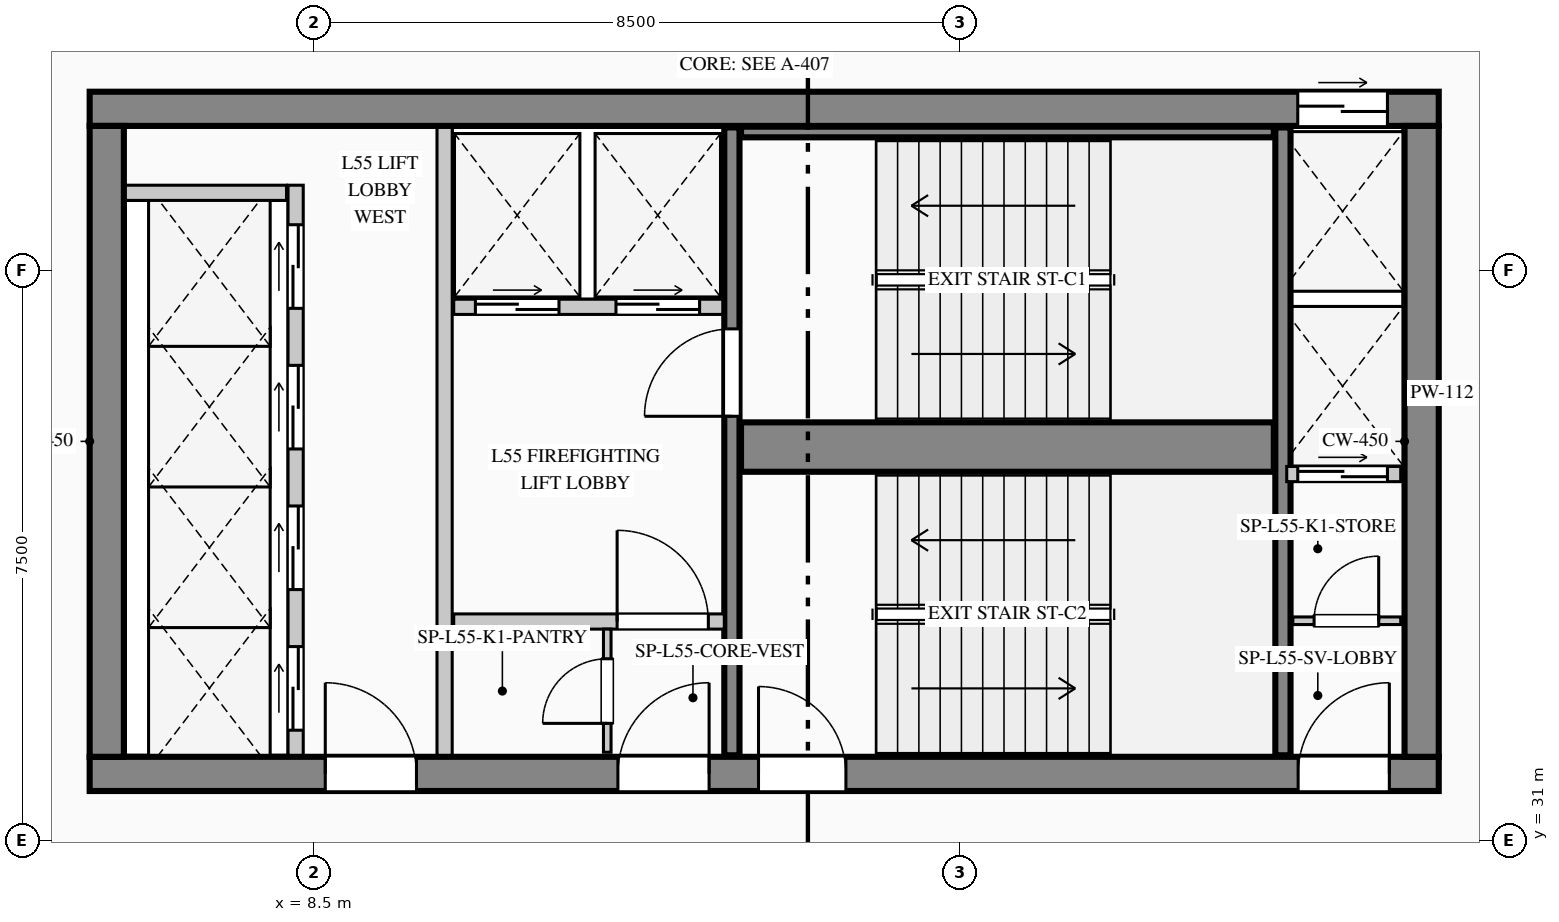
"""IFC4 building model, lengths in metres.
Left out: names, types, materials, properties, quantities, classifications, styles, units other than length and angle.
Written with IfcOpenShell. Run it as: python <this file> out.ifc"""

import sys

from ifc_helpers import new_model, si_unit, direction, frame, frame_2d, origin, place, context, subcontext, project, spatial, rectangle, extrude, element, fill, save


model = new_model("IFC4")
c1 = context("Model", 3, precision=1e-05, world=origin(), true_north=direction((0.0, 1.0)))
c2 = subcontext(c1, "Body", "Model", "MODEL_VIEW")
j1 = project(units=[si_unit("LENGTHUNIT", "METRE"), si_unit("PLANEANGLEUNIT", "RADIAN")], contexts=[c1])
p1 = place(None, origin())
s1 = spatial("IfcSite", under=j1, at=p1, CompositionType="ELEMENT")
p2 = place(p1, origin())
s2 = spatial("IfcBuilding", under=s1, at=p2, CompositionType="ELEMENT")
p3 = place(p2, frame((0.0, 0.0, 231.15)))
s3 = spatial("IfcBuildingStorey", under=s2, at=p3, CompositionType="ELEMENT", Elevation=231.15)
p4 = place(p3, frame((5.55, 40.625, 0.0), z_axis=(0.0, 0.0, 1.0), x_axis=(1.0, 0.0, 0.0)))
e1 = element("IfcWall", 1, at=p4, inside=s3, PredefinedType="SHEAR", context=c2, shape_type="SweptSolid", body=[
    extrude(rectangle(XDim=17.75, YDim=0.45, at=frame_2d((8.875, 0.0))), origin(), (0.0, 0.0, 1.0), 3.95),
])
p5 = place(p4, frame((15.895, 0.0, 0.0)))
e2 = element("IfcOpeningElement", 2, at=p5, cuts=e1, PredefinedType="OPENING", context=c2, shape_type="SweptSolid", body=[
    extrude(rectangle(XDim=1.18, YDim=2.25, at=frame_2d((0.59, 1.125))), frame((0.0, 0.235, 0.0), z_axis=(0.0, -1.0, 0.0), x_axis=(1.0, 0.0, 0.0)), (0.0, 0.0, 1.0), 0.47),
])
p6 = place(p3, frame((5.55, 31.875, 0.0), z_axis=(0.0, 0.0, 1.0), x_axis=(1.0, 0.0, 0.0)))
e3 = element("IfcWall", 3, at=p6, inside=s3, PredefinedType="SHEAR", context=c2, shape_type="SweptSolid", body=[
    extrude(rectangle(XDim=17.75, YDim=0.45, at=frame_2d((8.875, 0.0))), origin(), (0.0, 0.0, 1.0), 3.95),
])
p7 = place(p6, frame((3.1, 0.0, 0.0)))
e4 = element("IfcOpeningElement", 4, at=p7, cuts=e3, PredefinedType="OPENING", context=c2, shape_type="SweptSolid", body=[
    extrude(rectangle(XDim=1.2, YDim=2.2, at=frame_2d((0.6, 1.1))), frame((0.0, 0.235, 0.0), z_axis=(0.0, -1.0, 0.0), x_axis=(1.0, 0.0, 0.0)), (0.0, 0.0, 1.0), 0.47),
])
p8 = place(p6, frame((6.95, 0.0, 0.0)))
e5 = element("IfcOpeningElement", 5, at=p8, cuts=e3, PredefinedType="OPENING", context=c2, shape_type="SweptSolid", body=[
    extrude(rectangle(XDim=1.2, YDim=2.2, at=frame_2d((0.6, 1.1))), frame((0.0, 0.235, 0.0), z_axis=(0.0, -1.0, 0.0), x_axis=(1.0, 0.0, 0.0)), (0.0, 0.0, 1.0), 0.47),
])
p9 = place(p6, frame((8.8, 0.0, 0.0)))
e6 = element("IfcOpeningElement", 6, at=p9, cuts=e3, PredefinedType="OPENING", context=c2, shape_type="SweptSolid", body=[
    extrude(rectangle(XDim=1.15, YDim=2.2, at=frame_2d((0.575, 1.1))), frame((0.0, 0.235, 0.0), z_axis=(0.0, -1.0, 0.0), x_axis=(1.0, 0.0, 0.0)), (0.0, 0.0, 1.0), 0.47),
])
p10 = place(p6, frame((15.9, 0.0, 0.0)))
e7 = element("IfcOpeningElement", 7, at=p10, cuts=e3, PredefinedType="OPENING", context=c2, shape_type="SweptSolid", body=[
    extrude(rectangle(XDim=1.2, YDim=2.2, at=frame_2d((0.6, 1.1))), frame((0.0, 0.235, 0.0), z_axis=(0.0, -1.0, 0.0), x_axis=(1.0, 0.0, 0.0)), (0.0, 0.0, 1.0), 0.47),
])
for number, where, z_axis, x_axis in (
    (8, (5.775, 32.1, 0.0), (0.0, 0.0, 1.0), (0.0, 1.0, 0.0)),
    (9, (23.075, 32.1, 0.0), (0.0, 0.0, 1.0), (0.0, 1.0, 0.0)),
):
    element("IfcWall", number, at=place(p3, frame(where, z_axis=z_axis, x_axis=x_axis)), inside=s3, PredefinedType="SHEAR", context=c2, shape_type="SweptSolid", body=[
        extrude(rectangle(XDim=8.3, YDim=0.45, at=frame_2d((4.15, 0.0))), origin(), (0.0, 0.0, 1.0), 3.95),
    ])
p11 = place(p3, frame((14.0, 32.12, 0.0), z_axis=(0.0, 0.0, 1.0), x_axis=(0.0, 1.0, 0.0)))
e10 = element("IfcWall", 10, at=p11, inside=s3, PredefinedType="SHEAR", context=c2, shape_type="SweptSolid", body=[
    extrude(rectangle(XDim=8.26, YDim=0.2, at=frame_2d((4.13, 0.0))), origin(), (0.0, 0.0, 1.0), 3.95),
])
p12 = place(p11, frame((4.46, 0.0, 0.0)))
e11 = element("IfcOpeningElement", 11, at=p12, cuts=e10, PredefinedType="OPENING", context=c2, shape_type="SweptSolid", body=[
    extrude(rectangle(XDim=1.15, YDim=2.2, at=frame_2d((0.575, 1.1))), frame((0.0, 0.11, 0.0), z_axis=(0.0, -1.0, 0.0), x_axis=(1.0, 0.0, 0.0)), (0.0, 0.0, 1.0), 0.22),
])
p13 = place(p3, frame((14.12, 36.175, 0.0), z_axis=(0.0, 0.0, 1.0), x_axis=(1.0, 0.0, 0.0)))
e12 = element("IfcWall", 12, at=p13, inside=s3, PredefinedType="SHEAR", context=c2, shape_type="SweptSolid", body=[
    extrude(rectangle(XDim=7.01, YDim=0.65, at=frame_2d((3.505, 0.0))), origin(), (0.0, 0.0, 1.0), 3.95),
])
p14 = place(p3, frame((21.25, 32.12, 0.0), z_axis=(0.0, 0.0, 1.0), x_axis=(0.0, 1.0, 0.0)))
e13 = element("IfcWall", 13, at=p14, inside=s3, PredefinedType="SHEAR", context=c2, shape_type="SweptSolid", body=[
    extrude(rectangle(XDim=8.26, YDim=0.2, at=frame_2d((4.13, 0.0))), origin(), (0.0, 0.0, 1.0), 3.95),
])
p15 = place(p3, frame((14.12, 40.32, 0.0), z_axis=(0.0, 0.0, 1.0), x_axis=(1.0, 0.0, 0.0)))
e14 = element("IfcWall", 14, at=p15, inside=s3, PredefinedType="SHEAR", context=c2, shape_type="SweptSolid", body=[
    extrude(rectangle(XDim=7.01, YDim=0.14, at=frame_2d((3.505, 0.0))), origin(), (0.0, 0.0, 1.0), 3.95),
])
p16 = place(p3, frame((7.46, 4.62, 0.0), z_axis=(0.0, 0.0, 1.0), x_axis=(-0.123515576323, 0.992342633573, 0.0)))
e15 = element("IfcWall", 15, at=p16, inside=s3, PredefinedType="STANDARD", context=c2, shape_type="SweptSolid", body=[
    extrude(rectangle(XDim=37.043, YDim=0.24, at=frame_2d((18.522, 0.0))), origin(), (0.0, 0.0, 1.0), 3.7),
])
p17 = place(p16, frame((10.379, 0.0, 0.9)))
e16 = element("IfcOpeningElement", 16, at=p17, cuts=e15, PredefinedType="OPENING", context=c2, shape_type="SweptSolid", body=[
    extrude(rectangle(XDim=2.7, YDim=2.1, at=frame_2d((1.35, 1.05))), frame((0.0, 0.13, 0.0), z_axis=(0.0, -1.0, 0.0), x_axis=(1.0, 0.0, 0.0)), (0.0, 0.0, 1.0), 0.26),
])
p18 = place(p3, frame((8.26, 32.12, 0.0), z_axis=(0.0, 0.0, 1.0), x_axis=(0.0, 1.0, 0.0)))
e17 = element("IfcWall", 17, at=p18, inside=s3, PredefinedType="PARTITIONING", context=c2, shape_type="SweptSolid", body=[
    extrude(rectangle(XDim=7.5, YDim=0.2, at=frame_2d((3.75, 0.0))), origin(), (0.0, 0.0, 1.0), 3.7),
])
p19 = place(p18, frame((0.33, 0.0, 0.0)))
e18 = element("IfcOpeningElement", 18, at=p19, cuts=e17, PredefinedType="OPENING", context=c2, shape_type="SweptSolid", body=[
    extrude(rectangle(XDim=1.1, YDim=2.2, at=frame_2d((0.55, 1.1))), frame((0.0, 0.11, 0.0), z_axis=(0.0, -1.0, 0.0), x_axis=(1.0, 0.0, 0.0)), (0.0, 0.0, 1.0), 0.22),
])
p20 = place(p18, frame((2.18, 0.0, 0.0)))
e19 = element("IfcOpeningElement", 19, at=p20, cuts=e17, PredefinedType="OPENING", context=c2, shape_type="SweptSolid", body=[
    extrude(rectangle(XDim=1.1, YDim=2.2, at=frame_2d((0.55, 1.1))), frame((0.0, 0.11, 0.0), z_axis=(0.0, -1.0, 0.0), x_axis=(1.0, 0.0, 0.0)), (0.0, 0.0, 1.0), 0.22),
])
p21 = place(p18, frame((4.03, 0.0, 0.0)))
e20 = element("IfcOpeningElement", 20, at=p21, cuts=e17, PredefinedType="OPENING", context=c2, shape_type="SweptSolid", body=[
    extrude(rectangle(XDim=1.1, YDim=2.2, at=frame_2d((0.55, 1.1))), frame((0.0, 0.11, 0.0), z_axis=(0.0, -1.0, 0.0), x_axis=(1.0, 0.0, 0.0)), (0.0, 0.0, 1.0), 0.22),
])
p22 = place(p18, frame((5.88, 0.0, 0.0)))
e21 = element("IfcOpeningElement", 21, at=p22, cuts=e17, PredefinedType="OPENING", context=c2, shape_type="SweptSolid", body=[
    extrude(rectangle(XDim=1.1, YDim=2.2, at=frame_2d((0.55, 1.1))), frame((0.0, 0.11, 0.0), z_axis=(0.0, -1.0, 0.0), x_axis=(1.0, 0.0, 0.0)), (0.0, 0.0, 1.0), 0.22),
])
p23 = place(p3, frame((6.02, 39.52, 0.0), z_axis=(0.0, 0.0, 1.0), x_axis=(1.0, 0.0, 0.0)))
e22 = element("IfcWall", 22, at=p23, inside=s3, PredefinedType="PARTITIONING", context=c2, shape_type="SweptSolid", body=[
    extrude(rectangle(XDim=2.12, YDim=0.2, at=frame_2d((1.06, 0.0))), origin(), (0.0, 0.0, 1.0), 3.7),
])
p24 = place(p3, frame((10.22, 32.12, 0.0), z_axis=(0.0, 0.0, 1.0), x_axis=(0.0, 1.0, 0.0)))
e23 = element("IfcWall", 23, at=p24, inside=s3, PredefinedType="PARTITIONING", context=c2, shape_type="SweptSolid", body=[
    extrude(rectangle(XDim=8.26, YDim=0.2, at=frame_2d((4.13, 0.0))), origin(), (0.0, 0.0, 1.0), 3.7),
])
p25 = place(p3, frame((10.34, 38.02, 0.0), z_axis=(0.0, 0.0, 1.0), x_axis=(1.0, 0.0, 0.0)))
e24 = element("IfcWall", 24, at=p25, inside=s3, PredefinedType="PARTITIONING", context=c2, shape_type="SweptSolid", body=[
    extrude(rectangle(XDim=3.54, YDim=0.2, at=frame_2d((1.77, 0.0))), origin(), (0.0, 0.0, 1.0), 3.7),
])
p26 = place(p25, frame((0.285, 0.0, 0.0)))
e25 = element("IfcOpeningElement", 25, at=p26, cuts=e24, PredefinedType="OPENING", context=c2, shape_type="SweptSolid", body=[
    extrude(rectangle(XDim=1.1, YDim=2.2, at=frame_2d((0.55, 1.1))), frame((0.0, 0.11, 0.0), z_axis=(0.0, -1.0, 0.0), x_axis=(1.0, 0.0, 0.0)), (0.0, 0.0, 1.0), 0.22),
])
p27 = place(p25, frame((2.135, 0.0, 0.0)))
e26 = element("IfcOpeningElement", 26, at=p27, cuts=e24, PredefinedType="OPENING", context=c2, shape_type="SweptSolid", body=[
    extrude(rectangle(XDim=1.1, YDim=2.2, at=frame_2d((0.55, 1.1))), frame((0.0, 0.11, 0.0), z_axis=(0.0, -1.0, 0.0), x_axis=(1.0, 0.0, 0.0)), (0.0, 0.0, 1.0), 0.22),
])
p28 = place(p3, frame((10.34, 33.88, 0.0), z_axis=(0.0, 0.0, 1.0), x_axis=(1.0, 0.0, 0.0)))
e27 = element("IfcWall", 27, at=p28, inside=s3, PredefinedType="PARTITIONING", context=c2, shape_type="SweptSolid", body=[
    extrude(rectangle(XDim=3.56, YDim=0.2, at=frame_2d((1.78, 0.0))), origin(), (0.0, 0.0, 1.0), 3.7),
])
p29 = place(p28, frame((2.15, 0.0, 0.0)))
e28 = element("IfcOpeningElement", 28, at=p29, cuts=e27, PredefinedType="OPENING", context=c2, shape_type="SweptSolid", body=[
    extrude(rectangle(XDim=1.2, YDim=2.2, at=frame_2d((0.6, 1.1))), frame((0.0, 0.11, 0.0), z_axis=(0.0, -1.0, 0.0), x_axis=(1.0, 0.0, 0.0)), (0.0, 0.0, 1.0), 0.22),
])
p30 = place(p3, frame((12.36, 32.16, 0.0), z_axis=(0.0, 0.0, 1.0), x_axis=(0.0, 1.0, 0.0)))
e29 = element("IfcWall", 29, at=p30, inside=s3, PredefinedType="PARTITIONING", context=c2, shape_type="SweptSolid", body=[
    extrude(rectangle(XDim=1.62, YDim=0.1, at=frame_2d((0.81, 0.0))), origin(), (0.0, 0.0, 1.0), 3.7),
])
p31 = place(p30, frame((0.38, 0.0, 0.0)))
e30 = element("IfcOpeningElement", 30, at=p31, cuts=e29, PredefinedType="OPENING", context=c2, shape_type="SweptSolid", body=[
    extrude(rectangle(XDim=0.85, YDim=2.1, at=frame_2d((0.425, 1.05))), frame((0.0, 0.06, 0.0), z_axis=(0.0, -1.0, 0.0), x_axis=(1.0, 0.0, 0.0)), (0.0, 0.0, 1.0), 0.12),
])
p32 = place(p3, frame((21.38, 33.89, 0.0), z_axis=(0.0, 0.0, 1.0), x_axis=(1.0, 0.0, 0.0)))
e31 = element("IfcWall", 31, at=p32, inside=s3, PredefinedType="PARTITIONING", context=c2, shape_type="SweptSolid", body=[
    extrude(rectangle(XDim=1.42, YDim=0.1, at=frame_2d((0.71, 0.0))), origin(), (0.0, 0.0, 1.0), 3.7),
])
p33 = place(p32, frame((0.28, 0.0, 0.0)))
e32 = element("IfcOpeningElement", 32, at=p33, cuts=e31, PredefinedType="OPENING", context=c2, shape_type="SweptSolid", body=[
    extrude(rectangle(XDim=0.85, YDim=2.1, at=frame_2d((0.425, 1.05))), frame((0.0, 0.06, 0.0), z_axis=(0.0, -1.0, 0.0), x_axis=(1.0, 0.0, 0.0)), (0.0, 0.0, 1.0), 0.12),
])
p34 = place(p3, frame((21.3, 35.82, 0.0), z_axis=(0.0, 0.0, 1.0), x_axis=(1.0, 0.0, 0.0)))
e33 = element("IfcWall", 33, at=p34, inside=s3, PredefinedType="PARTITIONING", context=c2, shape_type="SweptSolid", body=[
    extrude(rectangle(XDim=1.5, YDim=0.2, at=frame_2d((0.75, 0.0))), origin(), (0.0, 0.0, 1.0), 3.7),
])
p35 = place(p34, frame((0.145, 0.0, 0.0)))
e34 = element("IfcOpeningElement", 34, at=p35, cuts=e33, PredefinedType="OPENING", context=c2, shape_type="SweptSolid", body=[
    extrude(rectangle(XDim=1.18, YDim=2.25, at=frame_2d((0.59, 1.125))), frame((0.0, 0.11, 0.0), z_axis=(0.0, -1.0, 0.0), x_axis=(1.0, 0.0, 0.0)), (0.0, 0.0, 1.0), 0.22),
])
p36 = place(p7, origin())
e35 = element("IfcDoor", 35, at=p36, inside=s3, OperationType="SINGLE_SWING_LEFT", PredefinedType="DOOR", context=c2, shape_type="SweptSolid", body=[
    extrude(rectangle(XDim=1.2, YDim=2.2, at=frame_2d((0.6, 1.1))), frame((0.0, 0.025, 0.0), z_axis=(0.0, -1.0, 0.0), x_axis=(1.0, 0.0, 0.0)), (0.0, 0.0, 1.0), 0.05),
])
fill(e4, e35)
p37 = place(p8, origin())
e36 = element("IfcDoor", 36, at=p37, inside=s3, OperationType="SINGLE_SWING_RIGHT", PredefinedType="DOOR", context=c2, shape_type="SweptSolid", body=[
    extrude(rectangle(XDim=1.2, YDim=2.2, at=frame_2d((0.6, 1.1))), frame((0.0, 0.025, 0.0), z_axis=(0.0, -1.0, 0.0), x_axis=(1.0, 0.0, 0.0)), (0.0, 0.0, 1.0), 0.05),
])
fill(e5, e36)
p38 = place(p9, origin())
e37 = element("IfcDoor", 37, at=p38, inside=s3, OperationType="SINGLE_SWING_LEFT", PredefinedType="DOOR", context=c2, shape_type="SweptSolid", body=[
    extrude(rectangle(XDim=1.15, YDim=2.2, at=frame_2d((0.575, 1.1))), frame((0.0, 0.025, 0.0), z_axis=(0.0, -1.0, 0.0), x_axis=(1.0, 0.0, 0.0)), (0.0, 0.0, 1.0), 0.05),
])
fill(e6, e37)
p39 = place(p10, origin())
e38 = element("IfcDoor", 38, at=p39, inside=s3, OperationType="SINGLE_SWING_RIGHT", PredefinedType="DOOR", context=c2, shape_type="SweptSolid", body=[
    extrude(rectangle(XDim=1.2, YDim=2.2, at=frame_2d((0.6, 1.1))), frame((0.0, 0.025, 0.0), z_axis=(0.0, -1.0, 0.0), x_axis=(1.0, 0.0, 0.0)), (0.0, 0.0, 1.0), 0.05),
])
fill(e7, e38)
p40 = place(p29, origin())
e39 = element("IfcDoor", 39, at=p40, inside=s3, OperationType="SINGLE_SWING_LEFT", PredefinedType="DOOR", context=c2, shape_type="SweptSolid", body=[
    extrude(rectangle(XDim=1.2, YDim=2.2, at=frame_2d((0.6, 1.1))), frame((0.0, 0.025, 0.0), z_axis=(0.0, -1.0, 0.0), x_axis=(1.0, 0.0, 0.0)), (0.0, 0.0, 1.0), 0.05),
])
fill(e28, e39)
p41 = place(p31, origin())
e40 = element("IfcDoor", 40, at=p41, inside=s3, OperationType="SINGLE_SWING_LEFT", PredefinedType="DOOR", context=c2, shape_type="SweptSolid", body=[
    extrude(rectangle(XDim=0.85, YDim=2.1, at=frame_2d((0.425, 1.05))), frame((0.0, 0.025, 0.0), z_axis=(0.0, -1.0, 0.0), x_axis=(1.0, 0.0, 0.0)), (0.0, 0.0, 1.0), 0.05),
])
fill(e30, e40)
p42 = place(p33, origin())
e41 = element("IfcDoor", 41, at=p42, inside=s3, OperationType="SINGLE_SWING_RIGHT", PredefinedType="DOOR", context=c2, shape_type="SweptSolid", body=[
    extrude(rectangle(XDim=0.85, YDim=2.1, at=frame_2d((0.425, 1.05))), frame((0.0, 0.025, 0.0), z_axis=(0.0, -1.0, 0.0), x_axis=(1.0, 0.0, 0.0)), (0.0, 0.0, 1.0), 0.05),
])
fill(e32, e41)
p43 = place(p12, origin())
e42 = element("IfcDoor", 42, at=p43, inside=s3, OperationType="SINGLE_SWING_LEFT", PredefinedType="DOOR", context=c2, shape_type="SweptSolid", body=[
    extrude(rectangle(XDim=1.15, YDim=2.2, at=frame_2d((0.575, 1.1))), frame((0.0, 0.025, 0.0), z_axis=(0.0, -1.0, 0.0), x_axis=(1.0, 0.0, 0.0)), (0.0, 0.0, 1.0), 0.05),
])
fill(e11, e42)
p44 = place(p19, origin())
e43 = element("IfcDoor", 43, at=p44, inside=s3, OperationType="DOUBLE_DOOR_SLIDING", PredefinedType="DOOR", context=c2, shape_type="SweptSolid", body=[
    extrude(rectangle(XDim=1.1, YDim=2.2, at=frame_2d((0.55, 1.1))), frame((0.0, 0.025, 0.0), z_axis=(0.0, -1.0, 0.0), x_axis=(1.0, 0.0, 0.0)), (0.0, 0.0, 1.0), 0.05),
])
fill(e18, e43)
p45 = place(p20, origin())
e44 = element("IfcDoor", 44, at=p45, inside=s3, OperationType="DOUBLE_DOOR_SLIDING", PredefinedType="DOOR", context=c2, shape_type="SweptSolid", body=[
    extrude(rectangle(XDim=1.1, YDim=2.2, at=frame_2d((0.55, 1.1))), frame((0.0, 0.025, 0.0), z_axis=(0.0, -1.0, 0.0), x_axis=(1.0, 0.0, 0.0)), (0.0, 0.0, 1.0), 0.05),
])
fill(e19, e44)
p46 = place(p21, origin())
e45 = element("IfcDoor", 45, at=p46, inside=s3, OperationType="DOUBLE_DOOR_SLIDING", PredefinedType="DOOR", context=c2, shape_type="SweptSolid", body=[
    extrude(rectangle(XDim=1.1, YDim=2.2, at=frame_2d((0.55, 1.1))), frame((0.0, 0.025, 0.0), z_axis=(0.0, -1.0, 0.0), x_axis=(1.0, 0.0, 0.0)), (0.0, 0.0, 1.0), 0.05),
])
fill(e20, e45)
p47 = place(p22, origin())
e46 = element("IfcDoor", 46, at=p47, inside=s3, OperationType="DOUBLE_DOOR_SLIDING", PredefinedType="DOOR", context=c2, shape_type="SweptSolid", body=[
    extrude(rectangle(XDim=1.1, YDim=2.2, at=frame_2d((0.55, 1.1))), frame((0.0, 0.025, 0.0), z_axis=(0.0, -1.0, 0.0), x_axis=(1.0, 0.0, 0.0)), (0.0, 0.0, 1.0), 0.05),
])
fill(e21, e46)
p48 = place(p26, origin())
e47 = element("IfcDoor", 47, at=p48, inside=s3, OperationType="DOUBLE_DOOR_SLIDING", PredefinedType="DOOR", context=c2, shape_type="SweptSolid", body=[
    extrude(rectangle(XDim=1.1, YDim=2.2, at=frame_2d((0.55, 1.1))), frame((0.0, 0.025, 0.0), z_axis=(0.0, -1.0, 0.0), x_axis=(1.0, 0.0, 0.0)), (0.0, 0.0, 1.0), 0.05),
])
fill(e25, e47)
p49 = place(p27, origin())
e48 = element("IfcDoor", 48, at=p49, inside=s3, OperationType="DOUBLE_DOOR_SLIDING", PredefinedType="DOOR", context=c2, shape_type="SweptSolid", body=[
    extrude(rectangle(XDim=1.1, YDim=2.2, at=frame_2d((0.55, 1.1))), frame((0.0, 0.025, 0.0), z_axis=(0.0, -1.0, 0.0), x_axis=(1.0, 0.0, 0.0)), (0.0, 0.0, 1.0), 0.05),
])
fill(e26, e48)
p50 = place(p5, origin())
e49 = element("IfcDoor", 49, at=p50, inside=s3, OperationType="DOUBLE_DOOR_SLIDING", PredefinedType="DOOR", context=c2, shape_type="SweptSolid", body=[
    extrude(rectangle(XDim=1.18, YDim=2.25, at=frame_2d((0.59, 1.125))), frame((0.0, 0.025, 0.0), z_axis=(0.0, -1.0, 0.0), x_axis=(1.0, 0.0, 0.0)), (0.0, 0.0, 1.0), 0.05),
])
fill(e2, e49)
p51 = place(p35, origin())
e50 = element("IfcDoor", 50, at=p51, inside=s3, OperationType="DOUBLE_DOOR_SLIDING", PredefinedType="DOOR", context=c2, shape_type="SweptSolid", body=[
    extrude(rectangle(XDim=1.18, YDim=2.25, at=frame_2d((0.59, 1.125))), frame((0.0, 0.025, 0.0), z_axis=(0.0, -1.0, 0.0), x_axis=(1.0, 0.0, 0.0)), (0.0, 0.0, 1.0), 0.05),
])
fill(e34, e50)
save(model, sys.argv[1])
